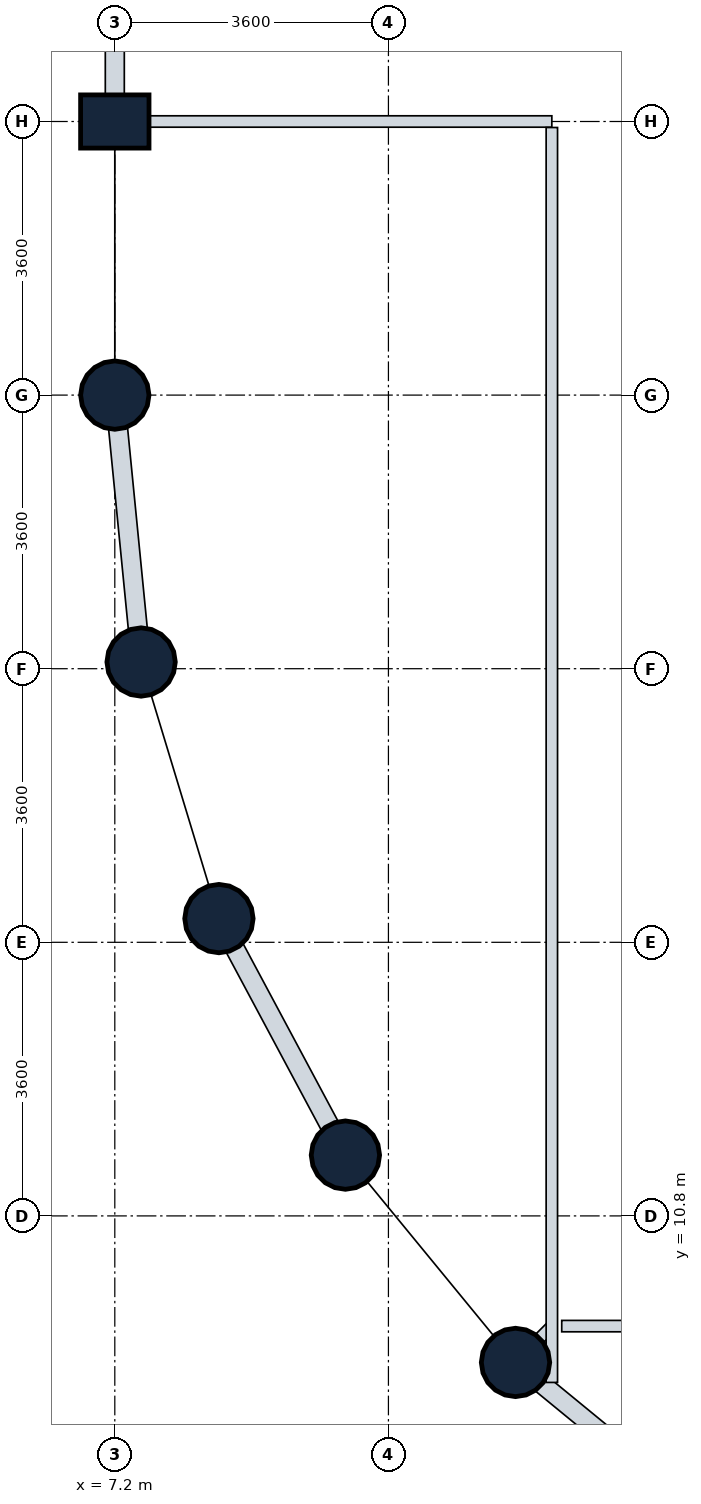
"""IFC4 building model, lengths in metres.
Left out: names, types, materials, properties, quantities, classifications, styles, units other than length and angle.
Written with IfcOpenShell. Run it as: python <this file> out.ifc"""

import sys

from ifc_helpers import new_model, si_unit, direction, frame, frame_2d, origin, origin_2d, place, context, subcontext, project, spatial, rectangle, circle, extrude, element, fill, save


model = new_model("IFC4")
c1 = context("Model", 3, precision=1e-05, world=origin(), true_north=direction((0.0, 1.0)))
c2 = subcontext(c1, "Body", "Model", "MODEL_VIEW")
j1 = project(units=[si_unit("LENGTHUNIT", "METRE"), si_unit("PLANEANGLEUNIT", "RADIAN")], contexts=[c1])
p1 = place(None, origin())
s1 = spatial("IfcSite", under=j1, at=p1, CompositionType="ELEMENT")
p2 = place(p1, origin())
s2 = spatial("IfcBuilding", under=s1, at=p2, CompositionType="ELEMENT")
p3 = place(p2, frame((0.0, 0.0, 209.0)))
s3 = spatial("IfcBuildingStorey", under=s2, at=p3, CompositionType="ELEMENT", Elevation=209.0)
p4 = place(p3, frame((7.2, 21.6, 0.0), z_axis=(0.0, 0.0, 1.0), x_axis=(1.0, 0.0, 0.0)))
e1 = element("IfcColumn", 1, at=p4, inside=s3, PredefinedType="COLUMN", context=c2, shape_type="SweptSolid", body=[
    extrude(circle(Radius=0.45, at=origin_2d()), origin(), (0.0, 0.0, 1.0), 4.8),
])
p5 = place(p3, frame((7.2, 25.2, 0.0), z_axis=(0.0, 0.0, 1.0), x_axis=(0.0, 1.0, 0.0)))
e2 = element("IfcColumn", 2, at=p5, inside=s3, PredefinedType="COLUMN", context=c2, shape_type="SweptSolid", body=[
    extrude(rectangle(XDim=0.7, YDim=0.9, at=origin_2d()), origin(), (0.0, 0.0, 1.0), 4.8),
])
for number, where, z_axis, x_axis in (
    (3, (7.546, 18.088, 0.0), (0.0, 0.0, 1.0), (1.0, 0.0, 0.0)),
    (4, (8.57, 14.712, 0.0), (0.0, 0.0, 1.0), (1.0, 0.0, 0.0)),
    (5, (10.234, 11.6, 0.0), (0.0, 0.0, 1.0), (1.0, 0.0, 0.0)),
    (6, (12.472, 8.872, 0.0), (0.0, 0.0, 1.0), (1.0, 0.0, 0.0)),
):
    element("IfcColumn", number, at=place(p3, frame(where, z_axis=z_axis, x_axis=x_axis)), inside=s3, PredefinedType="COLUMN", context=c2, shape_type="SweptSolid", body=[
        extrude(circle(Radius=0.45, at=origin_2d()), origin(), (0.0, 0.0, 1.0), 4.8),
    ])
p6 = place(p3, frame((7.2, 25.2, 0.0), z_axis=(0.0, 0.0, 1.0), x_axis=(0.0, 1.0, 0.0)))
e7 = element("IfcWall", 7, at=p6, inside=s3, PredefinedType="STANDARD", context=c2, shape_type="SweptSolid", body=[
    extrude(rectangle(XDim=3.6, YDim=0.25, at=frame_2d((1.8, 0.0))), origin(), (0.0, 0.0, 1.0), 3.93),
])
p7 = place(p3, frame((7.546, 18.088, 0.0), z_axis=(0.0, 0.0, 1.0), x_axis=(-0.09802417461, 0.995184033831, 0.0)))
e8 = element("IfcWall", 8, at=p7, inside=s3, PredefinedType="STANDARD", context=c2, shape_type="SweptSolid", body=[
    extrude(rectangle(XDim=3.529, YDim=0.25, at=frame_2d((1.765, 0.0))), origin(), (0.0, 0.0, 1.0), 3.93),
])
p8 = place(p7, frame((0.965, 0.0, 0.85)))
e9 = element("IfcOpeningElement", 9, at=p8, cuts=e8, PredefinedType="OPENING", context=c2, shape_type="SweptSolid", body=[
    extrude(rectangle(XDim=1.6, YDim=1.35, at=frame_2d((0.8, 0.675))), frame((0.0, 0.135, 0.0), z_axis=(0.0, -1.0, 0.0), x_axis=(1.0, 0.0, 0.0)), (0.0, 0.0, 1.0), 0.27),
])
p9 = place(p3, frame((10.234, 11.6, 0.0), z_axis=(0.0, 0.0, 1.0), x_axis=(-0.47151087309, 0.881860247748, 0.0)))
e10 = element("IfcWall", 10, at=p9, inside=s3, PredefinedType="STANDARD", context=c2, shape_type="SweptSolid", body=[
    extrude(rectangle(XDim=3.529, YDim=0.25, at=frame_2d((1.764, 0.0))), origin(), (0.0, 0.0, 1.0), 3.93),
])
p10 = place(p9, frame((0.964, 0.0, 0.85)))
e11 = element("IfcOpeningElement", 11, at=p10, cuts=e10, PredefinedType="OPENING", context=c2, shape_type="SweptSolid", body=[
    extrude(rectangle(XDim=1.6, YDim=1.35, at=frame_2d((0.8, 0.675))), frame((0.0, 0.135, 0.0), z_axis=(0.0, -1.0, 0.0), x_axis=(1.0, 0.0, 0.0)), (0.0, 0.0, 1.0), 0.27),
])
p11 = place(p3, frame((15.2, 6.634, 0.0), z_axis=(0.0, 0.0, 1.0), x_axis=(-0.773121216285, 0.634258295121, 0.0)))
e12 = element("IfcWall", 12, at=p11, inside=s3, PredefinedType="STANDARD", context=c2, shape_type="SweptSolid", body=[
    extrude(rectangle(XDim=3.529, YDim=0.25, at=frame_2d((1.764, 0.0))), origin(), (0.0, 0.0, 1.0), 3.93),
])
p12 = place(p11, frame((0.964, 0.0, 0.85)))
e13 = element("IfcOpeningElement", 13, at=p12, cuts=e12, PredefinedType="OPENING", context=c2, shape_type="SweptSolid", body=[
    extrude(rectangle(XDim=1.6, YDim=1.35, at=frame_2d((0.8, 0.675))), frame((0.0, 0.135, 0.0), z_axis=(0.0, -1.0, 0.0), x_axis=(1.0, 0.0, 0.0)), (0.0, 0.0, 1.0), 0.27),
])
p13 = place(p3, frame((7.329, 25.2, 0.0), z_axis=(0.0, 0.0, 1.0), x_axis=(1.0, 0.0, 0.0)))
e14 = element("IfcWall", 14, at=p13, inside=s3, PredefinedType="PARTITIONING", context=c2, shape_type="SweptSolid", body=[
    extrude(rectangle(XDim=5.621, YDim=0.15, at=frame_2d((2.811, 0.0))), origin(), (0.0, 0.0, 1.0), 4.535),
])
p14 = place(p3, frame((12.95, 9.35, 0.0), z_axis=(0.0, 0.0, 1.0), x_axis=(-0.706883613527, -0.707329878435, 0.0)))
e15 = element("IfcWall", 15, at=p14, inside=s3, PredefinedType="PARTITIONING", context=c2, shape_type="SweptSolid", body=[
    extrude(rectangle(XDim=0.547, YDim=0.15, at=frame_2d((0.273, 0.0))), origin(), (0.0, 0.0, 1.0), 4.26),
])
p15 = place(p3, frame((12.95, 8.609, 0.0), z_axis=(0.0, 0.0, 1.0), x_axis=(0.0, 1.0, 0.0)))
e16 = element("IfcWall", 16, at=p15, inside=s3, PredefinedType="PARTITIONING", context=c2, shape_type="SweptSolid", body=[
    extrude(rectangle(XDim=16.512, YDim=0.15, at=frame_2d((8.256, 0.0))), origin(), (0.0, 0.0, 1.0), 3.93),
])
p16 = place(p15, frame((7.731, 0.0, 0.0)))
e17 = element("IfcOpeningElement", 17, at=p16, cuts=e16, PredefinedType="OPENING", context=c2, shape_type="SweptSolid", body=[
    extrude(rectangle(XDim=1.0, YDim=2.1, at=frame_2d((0.5, 1.05))), frame((0.0, 0.085, 0.0), z_axis=(0.0, -1.0, 0.0), x_axis=(1.0, 0.0, 0.0)), (0.0, 0.0, 1.0), 0.17),
])
p17 = place(p3, frame((13.08, 9.35, 0.0), z_axis=(0.0, 0.0, 1.0), x_axis=(1.0, 0.0, 0.0)))
e18 = element("IfcWall", 18, at=p17, inside=s3, PredefinedType="PARTITIONING", context=c2, shape_type="SweptSolid", body=[
    extrude(rectangle(XDim=15.641, YDim=0.15, at=frame_2d((7.82, 0.0))), origin(), (0.0, 0.0, 1.0), 4.22),
])
p18 = place(p17, frame((4.706, 0.0, 0.0)))
e19 = element("IfcOpeningElement", 19, at=p18, cuts=e18, PredefinedType="OPENING", context=c2, shape_type="SweptSolid", body=[
    extrude(rectangle(XDim=1.0, YDim=2.1, at=frame_2d((0.5, 1.05))), frame((0.0, 0.085, 0.0), z_axis=(0.0, -1.0, 0.0), x_axis=(1.0, 0.0, 0.0)), (0.0, 0.0, 1.0), 0.17),
])
p19 = place(p8, origin())
e20 = element("IfcWindow", 20, at=p19, inside=s3, PartitioningType="SINGLE_PANEL", PredefinedType="WINDOW", context=c2, shape_type="SweptSolid", body=[
    extrude(rectangle(XDim=1.6, YDim=1.35, at=frame_2d((0.8, 0.675))), frame((0.0, 0.03, 0.0), z_axis=(0.0, -1.0, 0.0), x_axis=(1.0, 0.0, 0.0)), (0.0, 0.0, 1.0), 0.06),
])
fill(e9, e20)
p20 = place(p10, origin())
e21 = element("IfcWindow", 21, at=p20, inside=s3, PartitioningType="SINGLE_PANEL", PredefinedType="WINDOW", context=c2, shape_type="SweptSolid", body=[
    extrude(rectangle(XDim=1.6, YDim=1.35, at=frame_2d((0.8, 0.675))), frame((0.0, 0.03, 0.0), z_axis=(0.0, -1.0, 0.0), x_axis=(1.0, 0.0, 0.0)), (0.0, 0.0, 1.0), 0.06),
])
fill(e11, e21)
p21 = place(p12, origin())
e22 = element("IfcWindow", 22, at=p21, inside=s3, PartitioningType="SINGLE_PANEL", PredefinedType="WINDOW", context=c2, shape_type="SweptSolid", body=[
    extrude(rectangle(XDim=1.6, YDim=1.35, at=frame_2d((0.8, 0.675))), frame((0.0, 0.03, 0.0), z_axis=(0.0, -1.0, 0.0), x_axis=(1.0, 0.0, 0.0)), (0.0, 0.0, 1.0), 0.06),
])
fill(e13, e22)
p22 = place(p16, origin())
e23 = element("IfcDoor", 23, at=p22, inside=s3, OperationType="SINGLE_SWING_LEFT", PredefinedType="DOOR", context=c2, shape_type="SweptSolid", body=[
    extrude(rectangle(XDim=1.0, YDim=2.1, at=frame_2d((0.5, 1.05))), frame((0.0, 0.025, 0.0), z_axis=(0.0, -1.0, 0.0), x_axis=(1.0, 0.0, 0.0)), (0.0, 0.0, 1.0), 0.05),
])
fill(e17, e23)
save(model, sys.argv[1])
